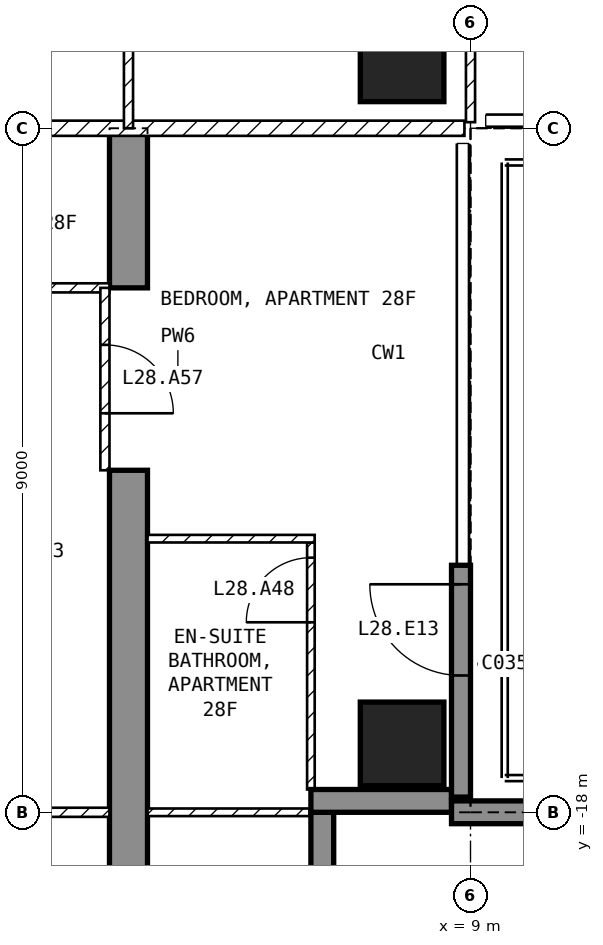
"""IFC4 building model, lengths in metres.
Left out: names, types, materials, properties, quantities, classifications, styles, units other than length and angle.
Written with IfcOpenShell. Run it as: python <this file> out.ifc"""

import sys

from ifc_helpers import new_model, si_unit, direction, frame, frame_2d, origin, origin_2d, place, context, subcontext, project, spatial, polyline, rectangle, outline, extrude, element, fill, save


model = new_model("IFC4")
c1 = context("Model", 3, precision=1e-05, world=origin(), true_north=direction((0.0, 1.0)))
c2 = subcontext(c1, "Body", "Model", "MODEL_VIEW")
j1 = project(units=[si_unit("LENGTHUNIT", "METRE"), si_unit("PLANEANGLEUNIT", "RADIAN")], contexts=[c1])
p1 = place(None, origin())
s1 = spatial("IfcSite", under=j1, at=p1, CompositionType="ELEMENT")
p2 = place(p1, origin())
s2 = spatial("IfcBuilding", under=s1, at=p2, CompositionType="ELEMENT")
p3 = place(p2, frame((0.0, 0.0, 119.9)))
s3 = spatial("IfcBuildingStorey", under=s2, at=p3, CompositionType="ELEMENT", Elevation=119.9)
for number, where, z_axis, x_axis in (
    (1, (8.1, -17.1, -0.25), (0.0, 0.0, 1.0), (1.0, 0.0, 0.0)),
    (2, (8.1, -8.1, -0.25), (0.0, 0.0, 1.0), (1.0, 0.0, 0.0)),
):
    element("IfcColumn", number, at=place(p3, frame(where, z_axis=z_axis, x_axis=x_axis)), inside=s3, PredefinedType="COLUMN", context=c2, shape_type="SweptSolid", body=[
        extrude(rectangle(XDim=1.1, YDim=1.1, at=origin_2d()), origin(), (0.0, 0.0, 1.0), 3.5),
    ])
p4 = place(p3, frame((4.25, -20.15, -0.25), z_axis=(1.0, 0.0, 0.0), x_axis=(0.0, 1.0, 0.0)))
e3 = element("IfcWall", 3, at=p4, inside=s3, PredefinedType="SHEAR", context=c2, shape_type="SweptSolid", body=[
    extrude(outline(polyline([(0.0, 0.0), (6.65, 0.0), (6.65, 2.65), (9.05, 2.65), (9.05, 0.0), (11.15, 0.0), (11.15, 3.5), (0.0, 3.5), (0.0, 0.0)])), origin(), (0.0, 0.0, 1.0), 0.5),
])
p5 = place(p3, frame((8.875, -17.8, 0.0), z_axis=(0.0, 0.0, 1.0), x_axis=(0.0, 1.0, 0.0)))
e4 = element("IfcWall", 4, at=p5, inside=s3, PredefinedType="SOLIDWALL", context=c2, shape_type="SweptSolid", body=[
    extrude(rectangle(XDim=3.05, YDim=0.25, at=frame_2d((1.525, 0.0))), origin(), (0.0, 0.0, 1.0), 3.25),
])
p6 = place(p5, frame((1.6, 0.0, 0.0)))
e5 = element("IfcOpeningElement", 5, at=p6, cuts=e4, PredefinedType="OPENING", context=c2, shape_type="SweptSolid", body=[
    extrude(rectangle(XDim=1.2, YDim=2.4, at=frame_2d((0.6, 1.2))), frame((0.0, 0.135, 0.0), z_axis=(0.0, -1.0, 0.0), x_axis=(1.0, 0.0, 0.0)), (0.0, 0.0, 1.0), 0.27),
])
p7 = place(p3, frame((7.05, -19.8, 0.0), z_axis=(0.0, 0.0, 1.0), x_axis=(0.0, 1.0, 0.0)))
e6 = element("IfcWall", 6, at=p7, inside=s3, PredefinedType="SOLIDWALL", context=c2, shape_type="SweptSolid", body=[
    extrude(rectangle(XDim=1.8, YDim=0.3, at=frame_2d((0.9, 0.0))), origin(), (0.0, 0.0, 1.0), 3.25),
])
p8 = place(p3, frame((6.9, -17.85, 0.0), z_axis=(0.0, 0.0, 1.0), x_axis=(1.0, 0.0, 0.0)))
e7 = element("IfcWall", 7, at=p8, inside=s3, PredefinedType="SOLIDWALL", context=c2, shape_type="SweptSolid", body=[
    extrude(rectangle(XDim=1.85, YDim=0.3, at=frame_2d((0.925, 0.0))), origin(), (0.0, 0.0, 1.0), 3.25),
])
p9 = place(p3, frame((8.75, -18.0, 0.0), z_axis=(0.0, 0.0, 1.0), x_axis=(1.0, 0.0, 0.0)))
e8 = element("IfcWall", 8, at=p9, inside=s3, PredefinedType="SOLIDWALL", context=c2, shape_type="SweptSolid", body=[
    extrude(rectangle(XDim=2.99, YDim=0.3, at=frame_2d((1.495, 0.0))), origin(), (0.0, 0.0, 1.0), 3.25),
])
p10 = place(p3, frame((8.92, -9.0, 0.0), z_axis=(0.0, 0.0, 1.0), x_axis=(-1.0, 0.0, 0.0)))
e9 = element("IfcWall", 9, at=p10, inside=s3, PredefinedType="PARTITIONING", context=c2, shape_type="SweptSolid", body=[
    extrude(rectangle(XDim=17.84, YDim=0.2, at=frame_2d((8.92, 0.0))), origin(), (0.0, 0.0, 1.0), 3.25),
])
p11 = place(p10, frame((8.42, 0.0, 0.0)))
e10 = element("IfcOpeningElement", 10, at=p11, cuts=e9, PredefinedType="OPENING", context=c2, shape_type="SweptSolid", body=[
    extrude(rectangle(XDim=1.0, YDim=2.1, at=frame_2d((0.5, 1.05))), frame((0.0, 0.11, 0.0), z_axis=(0.0, -1.0, 0.0), x_axis=(1.0, 0.0, 0.0)), (0.0, 0.0, 1.0), 0.22),
])
p12 = place(p3, frame((9.0, -8.92, 0.0), z_axis=(0.0, 0.0, 1.0), x_axis=(0.0, 1.0, 0.0)))
e11 = element("IfcWall", 11, at=p12, inside=s3, PredefinedType="PARTITIONING", context=c2, shape_type="SweptSolid", body=[
    extrude(rectangle(XDim=7.62, YDim=0.12, at=frame_2d((3.81, 0.0))), origin(), (0.0, 0.0, 1.0), 3.25),
])
p13 = place(p12, frame((5.12, 0.0, 0.0)))
e12 = element("IfcOpeningElement", 12, at=p13, cuts=e11, PredefinedType="OPENING", context=c2, shape_type="SweptSolid", body=[
    extrude(rectangle(XDim=0.9, YDim=2.1, at=frame_2d((0.45, 1.05))), frame((0.0, 0.07, 0.0), z_axis=(0.0, -1.0, 0.0), x_axis=(1.0, 0.0, 0.0)), (0.0, 0.0, 1.0), 0.14),
])
p14 = place(p3, frame((4.5, -9.0, 0.0), z_axis=(0.0, 0.0, 1.0), x_axis=(0.0, 1.0, 0.0)))
e13 = element("IfcWall", 13, at=p14, inside=s3, PredefinedType="PARTITIONING", context=c2, shape_type="SweptSolid", body=[
    extrude(rectangle(XDim=4.5, YDim=0.12, at=frame_2d((2.25, 0.0))), origin(), (0.0, 0.0, 1.0), 3.25),
])
p15 = place(p14, frame((3.36, 0.0, 0.0)))
e14 = element("IfcOpeningElement", 14, at=p15, cuts=e13, PredefinedType="OPENING", context=c2, shape_type="SweptSolid", body=[
    extrude(rectangle(XDim=0.9, YDim=2.1, at=frame_2d((0.45, 1.05))), frame((0.0, 0.07, 0.0), z_axis=(0.0, -1.0, 0.0), x_axis=(1.0, 0.0, 0.0)), (0.0, 0.0, 1.0), 0.14),
])
p16 = place(p3, frame((4.25, -11.1, 0.0), z_axis=(0.0, 0.0, 1.0), x_axis=(-1.0, 0.0, 0.0)))
e15 = element("IfcWall", 15, at=p16, inside=s3, PredefinedType="PARTITIONING", context=c2, shape_type="SweptSolid", body=[
    extrude(rectangle(XDim=6.35, YDim=0.12, at=frame_2d((3.175, 0.0))), origin(), (0.0, 0.0, 1.0), 3.25),
])
p17 = place(p16, frame((2.725, 0.0, 0.0)))
e16 = element("IfcOpeningElement", 16, at=p17, cuts=e15, PredefinedType="OPENING", context=c2, shape_type="SweptSolid", body=[
    extrude(rectangle(XDim=0.9, YDim=2.1, at=frame_2d((0.45, 1.05))), frame((0.0, 0.07, 0.0), z_axis=(0.0, -1.0, 0.0), x_axis=(1.0, 0.0, 0.0)), (0.0, 0.0, 1.0), 0.14),
])
p18 = place(p3, frame((4.25, -18.0, 0.0), z_axis=(0.0, 0.0, 1.0), x_axis=(-1.0, 0.0, 0.0)))
e17 = element("IfcWall", 17, at=p18, inside=s3, PredefinedType="PARTITIONING", context=c2, shape_type="SweptSolid", body=[
    extrude(rectangle(XDim=8.5, YDim=0.12, at=frame_2d((4.25, 0.0))), origin(), (0.0, 0.0, 1.0), 3.25),
])
p19 = place(p18, frame((1.925, 0.0, 0.0)))
e18 = element("IfcOpeningElement", 18, at=p19, cuts=e17, PredefinedType="OPENING", context=c2, shape_type="SweptSolid", body=[
    extrude(rectangle(XDim=0.9, YDim=2.1, at=frame_2d((0.45, 1.05))), frame((0.0, 0.07, 0.0), z_axis=(0.0, -1.0, 0.0), x_axis=(1.0, 0.0, 0.0)), (0.0, 0.0, 1.0), 0.14),
])
p20 = place(p3, frame((6.9, -17.7, 0.0), z_axis=(0.0, 0.0, 1.0), x_axis=(0.0, 1.0, 0.0)))
e19 = element("IfcWall", 19, at=p20, inside=s3, PredefinedType="PARTITIONING", context=c2, shape_type="SweptSolid", body=[
    extrude(rectangle(XDim=3.25, YDim=0.1, at=frame_2d((1.625, 0.0))), origin(), (0.0, 0.0, 1.0), 3.25),
])
p21 = place(p20, frame((2.2, 0.0, 0.0)))
e20 = element("IfcOpeningElement", 20, at=p21, cuts=e19, PredefinedType="OPENING", context=c2, shape_type="SweptSolid", body=[
    extrude(rectangle(XDim=0.85, YDim=2.1, at=frame_2d((0.425, 1.05))), frame((0.0, 0.06, 0.0), z_axis=(0.0, -1.0, 0.0), x_axis=(1.0, 0.0, 0.0)), (0.0, 0.0, 1.0), 0.12),
])
p22 = place(p3, frame((6.95, -14.4, 0.0), z_axis=(0.0, 0.0, 1.0), x_axis=(-1.0, 0.0, 0.0)))
e21 = element("IfcWall", 21, at=p22, inside=s3, PredefinedType="PARTITIONING", context=c2, shape_type="SweptSolid", body=[
    extrude(rectangle(XDim=2.2, YDim=0.1, at=frame_2d((1.1, 0.0))), origin(), (0.0, 0.0, 1.0), 3.25),
])
p23 = place(p3, frame((7.12, -18.0, 0.0), z_axis=(0.0, 0.0, 1.0), x_axis=(-1.0, 0.0, 0.0)))
e22 = element("IfcWall", 22, at=p23, inside=s3, PredefinedType="PARTITIONING", context=c2, shape_type="SweptSolid", body=[
    extrude(rectangle(XDim=2.37, YDim=0.1, at=frame_2d((1.185, 0.0))), origin(), (0.0, 0.0, 1.0), 3.25),
])
p24 = place(p3, frame((4.19, -11.1, 0.0), z_axis=(0.0, 0.0, 1.0), x_axis=(0.0, -1.0, 0.0)))
e23 = element("IfcWall", 23, at=p24, inside=s3, PredefinedType="PARTITIONING", context=c2, shape_type="SweptSolid", body=[
    extrude(rectangle(XDim=2.4, YDim=0.12, at=frame_2d((1.2, 0.0))), origin(), (0.0, 0.0, 1.0), 2.4),
])
p25 = place(p24, frame((0.75, 0.0, 0.0)))
e24 = element("IfcOpeningElement", 24, at=p25, cuts=e23, PredefinedType="OPENING", context=c2, shape_type="SweptSolid", body=[
    extrude(rectangle(XDim=0.9, YDim=2.1, at=frame_2d((0.45, 1.05))), frame((0.0, 0.07, 0.0), z_axis=(0.0, -1.0, 0.0), x_axis=(1.0, 0.0, 0.0)), (0.0, 0.0, 1.0), 0.14),
])
p26 = place(p6, origin())
e25 = element("IfcDoor", 25, at=p26, inside=s3, OperationType="SINGLE_SWING_RIGHT", PredefinedType="DOOR", context=c2, shape_type="SweptSolid", body=[
    extrude(rectangle(XDim=1.2, YDim=2.4, at=frame_2d((0.6, 1.2))), frame((0.0, 0.025, 0.0), z_axis=(0.0, -1.0, 0.0), x_axis=(1.0, 0.0, 0.0)), (0.0, 0.0, 1.0), 0.05),
])
fill(e5, e25)
p27 = place(p21, origin())
e26 = element("IfcDoor", 26, at=p27, inside=s3, OperationType="SINGLE_SWING_LEFT", PredefinedType="DOOR", context=c2, shape_type="SweptSolid", body=[
    extrude(rectangle(XDim=0.85, YDim=2.1, at=frame_2d((0.425, 1.05))), frame((0.0, 0.025, 0.0), z_axis=(0.0, -1.0, 0.0), x_axis=(1.0, 0.0, 0.0)), (0.0, 0.0, 1.0), 0.05),
])
fill(e20, e26)
p28 = place(p25, origin())
e27 = element("IfcDoor", 27, at=p28, inside=s3, OperationType="SINGLE_SWING_RIGHT", PredefinedType="DOOR", context=c2, shape_type="SweptSolid", body=[
    extrude(rectangle(XDim=0.9, YDim=2.1, at=frame_2d((0.45, 1.05))), frame((0.0, 0.025, 0.0), z_axis=(0.0, -1.0, 0.0), x_axis=(1.0, 0.0, 0.0)), (0.0, 0.0, 1.0), 0.05),
])
fill(e24, e27)
save(model, sys.argv[1])
